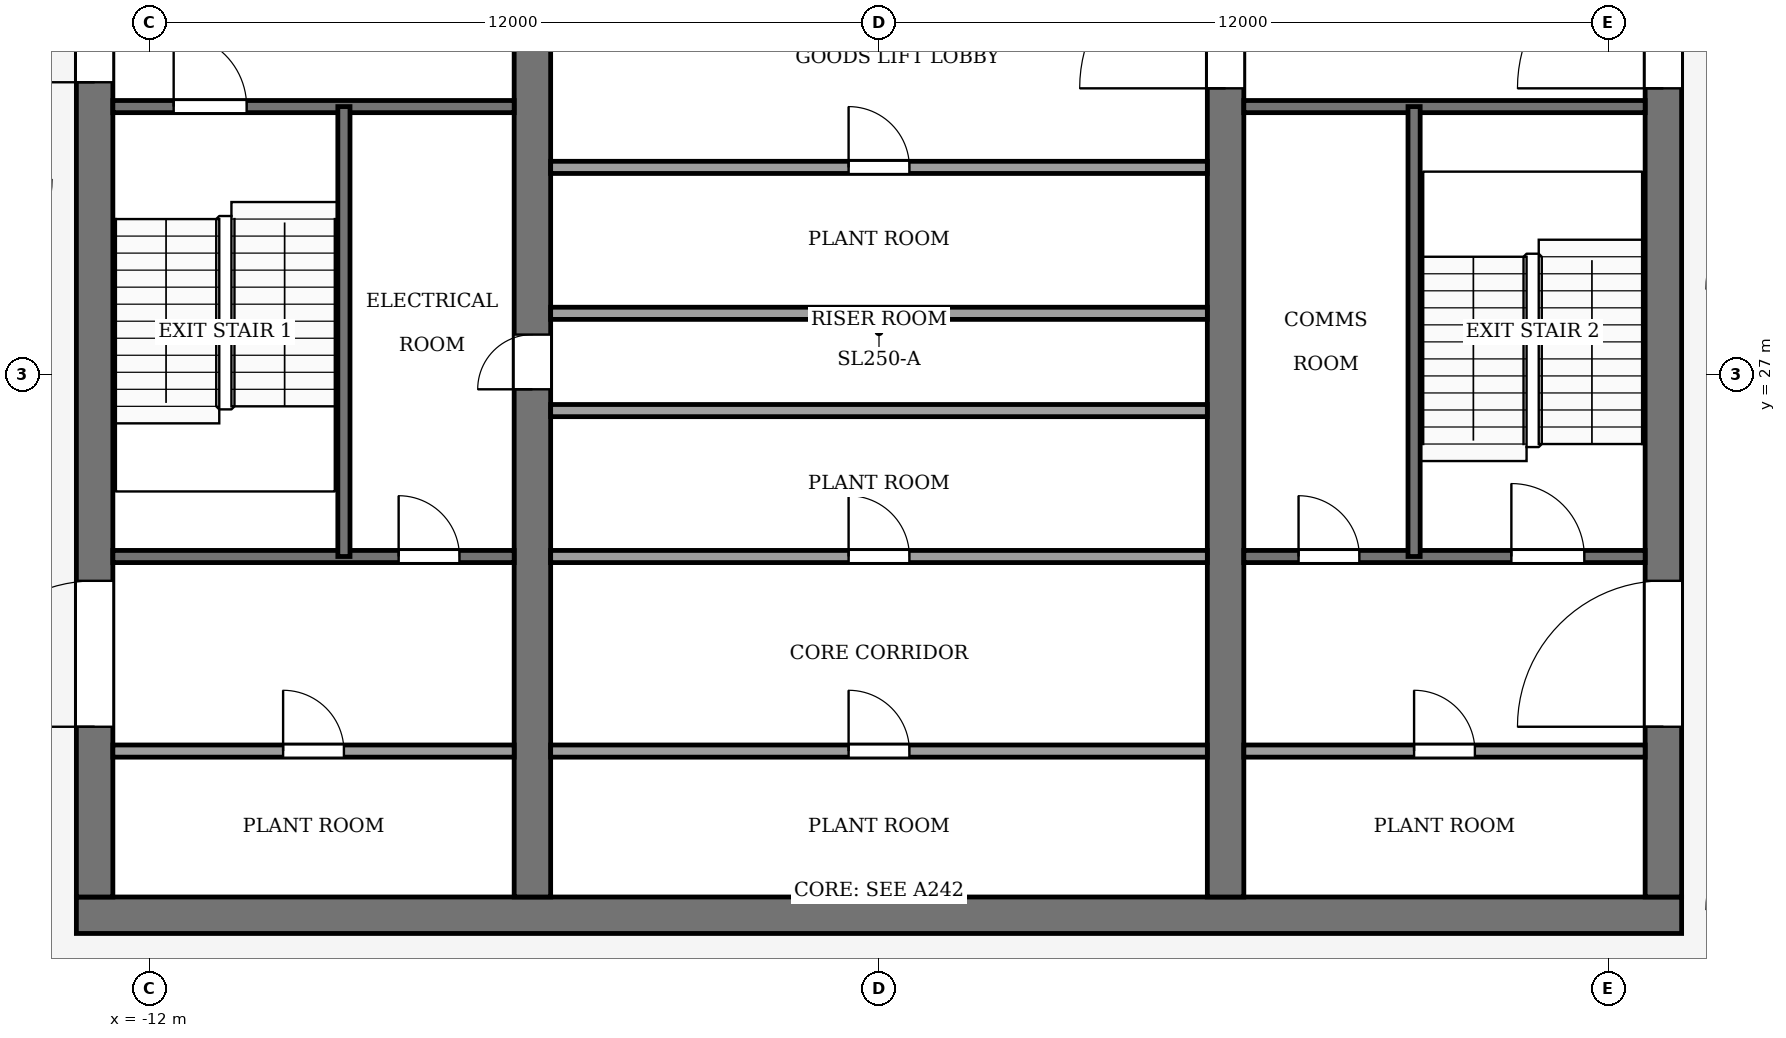
"""IFC4 building model, lengths in metres.
Left out: names, types, materials, properties, quantities, classifications, styles, units other than length and angle.
Written with IfcOpenShell. Run it as: python <this file> out.ifc"""

import sys

from ifc_helpers import new_model, si_unit, direction, frame, frame_2d, origin, place, context, subcontext, project, spatial, rectangle, extrude, element, fill, save


model = new_model("IFC4")
c1 = context("Model", 3, precision=1e-05, world=origin(), true_north=direction((0.0, 1.0)))
c2 = subcontext(c1, "Body", "Model", "MODEL_VIEW")
j1 = project(units=[si_unit("LENGTHUNIT", "METRE"), si_unit("PLANEANGLEUNIT", "RADIAN")], contexts=[c1])
p1 = place(None, origin())
s1 = spatial("IfcSite", under=j1, at=p1, CompositionType="ELEMENT")
p2 = place(p1, origin())
s2 = spatial("IfcBuilding", under=s1, at=p2, CompositionType="ELEMENT")
p3 = place(p2, frame((0.0, 0.0, 359.5)))
s3 = spatial("IfcBuildingStorey", under=s2, at=p3, CompositionType="ELEMENT", Elevation=359.5)
p4 = place(p3, frame((-13.2, 18.1, -0.15), z_axis=(0.0, 0.0, 1.0), x_axis=(1.0, 0.0, 0.0)))
e1 = element("IfcWall", 1, at=p4, inside=s3, PredefinedType="SHEAR", context=c2, shape_type="SweptSolid", body=[
    extrude(rectangle(XDim=26.4, YDim=0.6, at=frame_2d((13.2, 0.0))), origin(), (0.0, 0.0, 1.0), 4.5),
])
p5 = place(p3, frame((-12.9, 18.4, -0.15), z_axis=(0.0, 0.0, 1.0), x_axis=(0.0, 1.0, 0.0)))
e2 = element("IfcWall", 2, at=p5, inside=s3, PredefinedType="SHEAR", context=c2, shape_type="SweptSolid", body=[
    extrude(rectangle(XDim=19.2, YDim=0.6, at=frame_2d((9.6, 0.0))), origin(), (0.0, 0.0, 1.0), 4.5),
])
p6 = place(p5, frame((2.8, 0.0, 0.15)))
e3 = element("IfcOpeningElement", 3, at=p6, cuts=e2, PredefinedType="OPENING", context=c2, shape_type="SweptSolid", body=[
    extrude(rectangle(XDim=2.4, YDim=2.4, at=frame_2d((1.2, 1.2))), frame((0.0, 0.31, 0.0), z_axis=(0.0, -1.0, 0.0), x_axis=(1.0, 0.0, 0.0)), (0.0, 0.0, 1.0), 0.62),
])
p7 = place(p5, frame((13.4, 0.0, 0.15)))
e4 = element("IfcOpeningElement", 4, at=p7, cuts=e2, PredefinedType="OPENING", context=c2, shape_type="SweptSolid", body=[
    extrude(rectangle(XDim=1.4, YDim=2.2, at=frame_2d((0.7, 1.1))), frame((0.0, 0.31, 0.0), z_axis=(0.0, -1.0, 0.0), x_axis=(1.0, 0.0, 0.0)), (0.0, 0.0, 1.0), 0.62),
])
p8 = place(p3, frame((12.9, 18.4, -0.15), z_axis=(0.0, 0.0, 1.0), x_axis=(0.0, 1.0, 0.0)))
e5 = element("IfcWall", 5, at=p8, inside=s3, PredefinedType="SHEAR", context=c2, shape_type="SweptSolid", body=[
    extrude(rectangle(XDim=19.2, YDim=0.6, at=frame_2d((9.6, 0.0))), origin(), (0.0, 0.0, 1.0), 4.5),
])
p9 = place(p8, frame((2.8, 0.0, 0.15)))
e6 = element("IfcOpeningElement", 6, at=p9, cuts=e5, PredefinedType="OPENING", context=c2, shape_type="SweptSolid", body=[
    extrude(rectangle(XDim=2.4, YDim=2.4, at=frame_2d((1.2, 1.2))), frame((0.0, 0.31, 0.0), z_axis=(0.0, -1.0, 0.0), x_axis=(1.0, 0.0, 0.0)), (0.0, 0.0, 1.0), 0.62),
])
p10 = place(p8, frame((13.3, 0.0, 0.15)))
e7 = element("IfcOpeningElement", 7, at=p10, cuts=e5, PredefinedType="OPENING", context=c2, shape_type="SweptSolid", body=[
    extrude(rectangle(XDim=2.4, YDim=2.4, at=frame_2d((1.2, 1.2))), frame((0.0, 0.31, 0.0), z_axis=(0.0, -1.0, 0.0), x_axis=(1.0, 0.0, 0.0)), (0.0, 0.0, 1.0), 0.62),
])
p11 = place(p3, frame((-5.7, 18.4, -0.15), z_axis=(0.0, 0.0, 1.0), x_axis=(0.0, 1.0, 0.0)))
e8 = element("IfcWall", 8, at=p11, inside=s3, PredefinedType="SHEAR", context=c2, shape_type="SweptSolid", body=[
    extrude(rectangle(XDim=19.2, YDim=0.6, at=frame_2d((9.6, 0.0))), origin(), (0.0, 0.0, 1.0), 4.5),
])
p12 = place(p11, frame((8.35, 0.0, 0.15)))
e9 = element("IfcOpeningElement", 9, at=p12, cuts=e8, PredefinedType="OPENING", context=c2, shape_type="SweptSolid", body=[
    extrude(rectangle(XDim=0.9, YDim=2.1, at=frame_2d((0.45, 1.05))), frame((0.0, 0.31, 0.0), z_axis=(0.0, -1.0, 0.0), x_axis=(1.0, 0.0, 0.0)), (0.0, 0.0, 1.0), 0.62),
])
p13 = place(p3, frame((5.7, 18.4, -0.15), z_axis=(0.0, 0.0, 1.0), x_axis=(0.0, 1.0, 0.0)))
e10 = element("IfcWall", 10, at=p13, inside=s3, PredefinedType="SHEAR", context=c2, shape_type="SweptSolid", body=[
    extrude(rectangle(XDim=19.2, YDim=0.6, at=frame_2d((9.6, 0.0))), origin(), (0.0, 0.0, 1.0), 4.5),
])
p14 = place(p13, frame((13.3, 0.0, 0.15)))
e11 = element("IfcOpeningElement", 11, at=p14, cuts=e10, PredefinedType="OPENING", context=c2, shape_type="SweptSolid", body=[
    extrude(rectangle(XDim=2.4, YDim=2.4, at=frame_2d((1.2, 1.2))), frame((0.0, 0.31, 0.0), z_axis=(0.0, -1.0, 0.0), x_axis=(1.0, 0.0, 0.0)), (0.0, 0.0, 1.0), 0.62),
])
p15 = place(p3, frame((-12.6, 20.8, 0.0), z_axis=(0.0, 0.0, 1.0), x_axis=(1.0, 0.0, 0.0)))
e12 = element("IfcWall", 12, at=p15, inside=s3, PredefinedType="PARTITIONING", context=c2, shape_type="SweptSolid", body=[
    extrude(rectangle(XDim=6.6, YDim=0.2, at=frame_2d((3.3, 0.0))), origin(), (0.0, 0.0, 1.0), 4.35),
])
p16 = place(p15, frame((2.8, 0.0, 0.0)))
e13 = element("IfcOpeningElement", 13, at=p16, cuts=e12, PredefinedType="OPENING", context=c2, shape_type="SweptSolid", body=[
    extrude(rectangle(XDim=1.0, YDim=2.1, at=frame_2d((0.5, 1.05))), frame((0.0, 0.11, 0.0), z_axis=(0.0, -1.0, 0.0), x_axis=(1.0, 0.0, 0.0)), (0.0, 0.0, 1.0), 0.22),
])
p17 = place(p3, frame((-5.4, 20.8, 0.0), z_axis=(0.0, 0.0, 1.0), x_axis=(1.0, 0.0, 0.0)))
e14 = element("IfcWall", 14, at=p17, inside=s3, PredefinedType="PARTITIONING", context=c2, shape_type="SweptSolid", body=[
    extrude(rectangle(XDim=10.8, YDim=0.2, at=frame_2d((5.4, 0.0))), origin(), (0.0, 0.0, 1.0), 4.35),
])
p18 = place(p17, frame((4.9, 0.0, 0.0)))
e15 = element("IfcOpeningElement", 15, at=p18, cuts=e14, PredefinedType="OPENING", context=c2, shape_type="SweptSolid", body=[
    extrude(rectangle(XDim=1.0, YDim=2.1, at=frame_2d((0.5, 1.05))), frame((0.0, 0.11, 0.0), z_axis=(0.0, -1.0, 0.0), x_axis=(1.0, 0.0, 0.0)), (0.0, 0.0, 1.0), 0.22),
])
p19 = place(p3, frame((6.0, 20.8, 0.0), z_axis=(0.0, 0.0, 1.0), x_axis=(1.0, 0.0, 0.0)))
e16 = element("IfcWall", 16, at=p19, inside=s3, PredefinedType="PARTITIONING", context=c2, shape_type="SweptSolid", body=[
    extrude(rectangle(XDim=6.6, YDim=0.2, at=frame_2d((3.3, 0.0))), origin(), (0.0, 0.0, 1.0), 4.35),
])
p20 = place(p19, frame((2.8, 0.0, 0.0)))
e17 = element("IfcOpeningElement", 17, at=p20, cuts=e16, PredefinedType="OPENING", context=c2, shape_type="SweptSolid", body=[
    extrude(rectangle(XDim=1.0, YDim=2.1, at=frame_2d((0.5, 1.05))), frame((0.0, 0.11, 0.0), z_axis=(0.0, -1.0, 0.0), x_axis=(1.0, 0.0, 0.0)), (0.0, 0.0, 1.0), 0.22),
])
p21 = place(p3, frame((-12.6, 24.0, 0.0), z_axis=(0.0, 0.0, 1.0), x_axis=(1.0, 0.0, 0.0)))
e18 = element("IfcWall", 18, at=p21, inside=s3, PredefinedType="PARTITIONING", context=c2, shape_type="SweptSolid", body=[
    extrude(rectangle(XDim=6.6, YDim=0.2, at=frame_2d((3.3, 0.0))), origin(), (0.0, 0.0, 1.0), 4.35),
])
p22 = place(p21, frame((4.7, 0.0, 0.0)))
e19 = element("IfcOpeningElement", 19, at=p22, cuts=e18, PredefinedType="OPENING", context=c2, shape_type="SweptSolid", body=[
    extrude(rectangle(XDim=1.0, YDim=2.1, at=frame_2d((0.5, 1.05))), frame((0.0, 0.11, 0.0), z_axis=(0.0, -1.0, 0.0), x_axis=(1.0, 0.0, 0.0)), (0.0, 0.0, 1.0), 0.22),
])
p23 = place(p3, frame((-5.4, 24.0, 0.0), z_axis=(0.0, 0.0, 1.0), x_axis=(1.0, 0.0, 0.0)))
e20 = element("IfcWall", 20, at=p23, inside=s3, PredefinedType="PARTITIONING", context=c2, shape_type="SweptSolid", body=[
    extrude(rectangle(XDim=10.8, YDim=0.2, at=frame_2d((5.4, 0.0))), origin(), (0.0, 0.0, 1.0), 4.35),
])
p24 = place(p23, frame((4.9, 0.0, 0.0)))
e21 = element("IfcOpeningElement", 21, at=p24, cuts=e20, PredefinedType="OPENING", context=c2, shape_type="SweptSolid", body=[
    extrude(rectangle(XDim=1.0, YDim=2.1, at=frame_2d((0.5, 1.05))), frame((0.0, 0.11, 0.0), z_axis=(0.0, -1.0, 0.0), x_axis=(1.0, 0.0, 0.0)), (0.0, 0.0, 1.0), 0.22),
])
p25 = place(p3, frame((6.0, 24.0, 0.0), z_axis=(0.0, 0.0, 1.0), x_axis=(1.0, 0.0, 0.0)))
e22 = element("IfcWall", 22, at=p25, inside=s3, PredefinedType="PARTITIONING", context=c2, shape_type="SweptSolid", body=[
    extrude(rectangle(XDim=6.6, YDim=0.2, at=frame_2d((3.3, 0.0))), origin(), (0.0, 0.0, 1.0), 4.35),
])
p26 = place(p25, frame((0.9, 0.0, 0.0)))
e23 = element("IfcOpeningElement", 23, at=p26, cuts=e22, PredefinedType="OPENING", context=c2, shape_type="SweptSolid", body=[
    extrude(rectangle(XDim=1.0, YDim=2.1, at=frame_2d((0.5, 1.05))), frame((0.0, 0.11, 0.0), z_axis=(0.0, -1.0, 0.0), x_axis=(1.0, 0.0, 0.0)), (0.0, 0.0, 1.0), 0.22),
])
p27 = place(p25, frame((4.4, 0.0, 0.0)))
e24 = element("IfcOpeningElement", 24, at=p27, cuts=e22, PredefinedType="OPENING", context=c2, shape_type="SweptSolid", body=[
    extrude(rectangle(XDim=1.2, YDim=2.2, at=frame_2d((0.6, 1.1))), frame((0.0, 0.11, 0.0), z_axis=(0.0, -1.0, 0.0), x_axis=(1.0, 0.0, 0.0)), (0.0, 0.0, 1.0), 0.22),
])
for number, where, z_axis, x_axis in (
    (25, (-5.4, 26.4, 0.0), (0.0, 0.0, 1.0), (1.0, 0.0, 0.0)),
    (26, (-5.4, 28.0, 0.0), (0.0, 0.0, 1.0), (1.0, 0.0, 0.0)),
):
    element("IfcWall", number, at=place(p3, frame(where, z_axis=z_axis, x_axis=x_axis)), inside=s3, PredefinedType="PARTITIONING", context=c2, shape_type="SweptSolid", body=[
        extrude(rectangle(XDim=10.8, YDim=0.2, at=frame_2d((5.4, 0.0))), origin(), (0.0, 0.0, 1.0), 4.35),
    ])
p28 = place(p3, frame((-5.4, 30.4, 0.0), z_axis=(0.0, 0.0, 1.0), x_axis=(1.0, 0.0, 0.0)))
e27 = element("IfcWall", 27, at=p28, inside=s3, PredefinedType="PARTITIONING", context=c2, shape_type="SweptSolid", body=[
    extrude(rectangle(XDim=10.8, YDim=0.2, at=frame_2d((5.4, 0.0))), origin(), (0.0, 0.0, 1.0), 4.35),
])
p29 = place(p28, frame((4.9, 0.0, 0.0)))
e28 = element("IfcOpeningElement", 28, at=p29, cuts=e27, PredefinedType="OPENING", context=c2, shape_type="SweptSolid", body=[
    extrude(rectangle(XDim=1.0, YDim=2.1, at=frame_2d((0.5, 1.05))), frame((0.0, 0.11, 0.0), z_axis=(0.0, -1.0, 0.0), x_axis=(1.0, 0.0, 0.0)), (0.0, 0.0, 1.0), 0.22),
])
p30 = place(p3, frame((-12.6, 31.4, 0.0), z_axis=(0.0, 0.0, 1.0), x_axis=(1.0, 0.0, 0.0)))
e29 = element("IfcWall", 29, at=p30, inside=s3, PredefinedType="PARTITIONING", context=c2, shape_type="SweptSolid", body=[
    extrude(rectangle(XDim=6.6, YDim=0.2, at=frame_2d((3.3, 0.0))), origin(), (0.0, 0.0, 1.0), 4.35),
])
p31 = place(p30, frame((1.0, 0.0, 0.0)))
e30 = element("IfcOpeningElement", 30, at=p31, cuts=e29, PredefinedType="OPENING", context=c2, shape_type="SweptSolid", body=[
    extrude(rectangle(XDim=1.2, YDim=2.2, at=frame_2d((0.6, 1.1))), frame((0.0, 0.11, 0.0), z_axis=(0.0, -1.0, 0.0), x_axis=(1.0, 0.0, 0.0)), (0.0, 0.0, 1.0), 0.22),
])
p32 = place(p3, frame((6.0, 31.4, 0.0), z_axis=(0.0, 0.0, 1.0), x_axis=(1.0, 0.0, 0.0)))
e31 = element("IfcWall", 31, at=p32, inside=s3, PredefinedType="PARTITIONING", context=c2, shape_type="SweptSolid", body=[
    extrude(rectangle(XDim=6.6, YDim=0.2, at=frame_2d((3.3, 0.0))), origin(), (0.0, 0.0, 1.0), 4.35),
])
for number, where, z_axis, x_axis in (
    (32, (-8.8, 24.0, 0.0), (0.0, 0.0, 1.0), (0.0, 1.0, 0.0)),
    (33, (8.8, 24.0, 0.0), (0.0, 0.0, 1.0), (0.0, 1.0, 0.0)),
):
    element("IfcWall", number, at=place(p3, frame(where, z_axis=z_axis, x_axis=x_axis)), inside=s3, PredefinedType="PARTITIONING", context=c2, shape_type="SweptSolid", body=[
        extrude(rectangle(XDim=7.4, YDim=0.2, at=frame_2d((3.7, 0.0))), origin(), (0.0, 0.0, 1.0), 4.35),
    ])
p33 = place(p18, origin())
e34 = element("IfcDoor", 34, at=p33, inside=s3, OperationType="SINGLE_SWING_LEFT", PredefinedType="DOOR", context=c2, shape_type="SweptSolid", body=[
    extrude(rectangle(XDim=1.0, YDim=2.1, at=frame_2d((0.5, 1.05))), frame((0.0, 0.025, 0.0), z_axis=(0.0, -1.0, 0.0), x_axis=(1.0, 0.0, 0.0)), (0.0, 0.0, 1.0), 0.05),
])
fill(e15, e34)
p34 = place(p24, origin())
e35 = element("IfcDoor", 35, at=p34, inside=s3, OperationType="SINGLE_SWING_RIGHT", PredefinedType="DOOR", context=c2, shape_type="SweptSolid", body=[
    extrude(rectangle(XDim=1.0, YDim=2.1, at=frame_2d((0.5, 1.05))), frame((0.0, 0.025, 0.0), z_axis=(0.0, -1.0, 0.0), x_axis=(1.0, 0.0, 0.0)), (0.0, 0.0, 1.0), 0.05),
])
fill(e21, e35)
p35 = place(p29, origin())
e36 = element("IfcDoor", 36, at=p35, inside=s3, OperationType="SINGLE_SWING_LEFT", PredefinedType="DOOR", context=c2, shape_type="SweptSolid", body=[
    extrude(rectangle(XDim=1.0, YDim=2.1, at=frame_2d((0.5, 1.05))), frame((0.0, 0.025, 0.0), z_axis=(0.0, -1.0, 0.0), x_axis=(1.0, 0.0, 0.0)), (0.0, 0.0, 1.0), 0.05),
])
fill(e28, e36)
p36 = place(p16, origin())
e37 = element("IfcDoor", 37, at=p36, inside=s3, OperationType="SINGLE_SWING_RIGHT", PredefinedType="DOOR", context=c2, shape_type="SweptSolid", body=[
    extrude(rectangle(XDim=1.0, YDim=2.1, at=frame_2d((0.5, 1.05))), frame((0.0, 0.025, 0.0), z_axis=(0.0, -1.0, 0.0), x_axis=(1.0, 0.0, 0.0)), (0.0, 0.0, 1.0), 0.05),
])
fill(e13, e37)
p37 = place(p20, origin())
e38 = element("IfcDoor", 38, at=p37, inside=s3, OperationType="SINGLE_SWING_LEFT", PredefinedType="DOOR", context=c2, shape_type="SweptSolid", body=[
    extrude(rectangle(XDim=1.0, YDim=2.1, at=frame_2d((0.5, 1.05))), frame((0.0, 0.025, 0.0), z_axis=(0.0, -1.0, 0.0), x_axis=(1.0, 0.0, 0.0)), (0.0, 0.0, 1.0), 0.05),
])
fill(e17, e38)
p38 = place(p22, origin())
e39 = element("IfcDoor", 39, at=p38, inside=s3, OperationType="SINGLE_SWING_LEFT", PredefinedType="DOOR", context=c2, shape_type="SweptSolid", body=[
    extrude(rectangle(XDim=1.0, YDim=2.1, at=frame_2d((0.5, 1.05))), frame((0.0, 0.025, 0.0), z_axis=(0.0, -1.0, 0.0), x_axis=(1.0, 0.0, 0.0)), (0.0, 0.0, 1.0), 0.05),
])
fill(e19, e39)
p39 = place(p26, origin())
e40 = element("IfcDoor", 40, at=p39, inside=s3, OperationType="SINGLE_SWING_RIGHT", PredefinedType="DOOR", context=c2, shape_type="SweptSolid", body=[
    extrude(rectangle(XDim=1.0, YDim=2.1, at=frame_2d((0.5, 1.05))), frame((0.0, 0.025, 0.0), z_axis=(0.0, -1.0, 0.0), x_axis=(1.0, 0.0, 0.0)), (0.0, 0.0, 1.0), 0.05),
])
fill(e23, e40)
p40 = place(p12, origin())
e41 = element("IfcDoor", 41, at=p40, inside=s3, OperationType="SINGLE_SWING_LEFT", PredefinedType="DOOR", context=c2, shape_type="SweptSolid", body=[
    extrude(rectangle(XDim=0.9, YDim=2.1, at=frame_2d((0.45, 1.05))), frame((0.0, 0.025, 0.0), z_axis=(0.0, -1.0, 0.0), x_axis=(1.0, 0.0, 0.0)), (0.0, 0.0, 1.0), 0.05),
])
fill(e9, e41)
p41 = place(p31, origin())
e42 = element("IfcDoor", 42, at=p41, inside=s3, OperationType="SINGLE_SWING_LEFT", PredefinedType="DOOR", context=c2, shape_type="SweptSolid", body=[
    extrude(rectangle(XDim=1.2, YDim=2.2, at=frame_2d((0.6, 1.1))), frame((0.0, 0.025, 0.0), z_axis=(0.0, -1.0, 0.0), x_axis=(1.0, 0.0, 0.0)), (0.0, 0.0, 1.0), 0.05),
])
fill(e30, e42)
p42 = place(p27, origin())
e43 = element("IfcDoor", 43, at=p42, inside=s3, OperationType="SINGLE_SWING_RIGHT", PredefinedType="DOOR", context=c2, shape_type="SweptSolid", body=[
    extrude(rectangle(XDim=1.2, YDim=2.2, at=frame_2d((0.6, 1.1))), frame((0.0, 0.025, 0.0), z_axis=(0.0, -1.0, 0.0), x_axis=(1.0, 0.0, 0.0)), (0.0, 0.0, 1.0), 0.05),
])
fill(e24, e43)
p43 = place(p14, origin())
e44 = element("IfcDoor", 44, at=p43, inside=s3, OperationType="DOUBLE_DOOR_SINGLE_SWING", PredefinedType="DOOR", context=c2, shape_type="SweptSolid", body=[
    extrude(rectangle(XDim=2.4, YDim=2.4, at=frame_2d((1.2, 1.2))), frame((0.0, 0.025, 0.0), z_axis=(0.0, -1.0, 0.0), x_axis=(1.0, 0.0, 0.0)), (0.0, 0.0, 1.0), 0.05),
])
fill(e11, e44)
p44 = place(p6, origin())
e45 = element("IfcDoor", 45, at=p44, inside=s3, OperationType="DOUBLE_DOOR_SINGLE_SWING", PredefinedType="DOOR", context=c2, shape_type="SweptSolid", body=[
    extrude(rectangle(XDim=2.4, YDim=2.4, at=frame_2d((1.2, 1.2))), frame((0.0, 0.025, 0.0), z_axis=(0.0, -1.0, 0.0), x_axis=(1.0, 0.0, 0.0)), (0.0, 0.0, 1.0), 0.05),
])
fill(e3, e45)
p45 = place(p9, origin())
e46 = element("IfcDoor", 46, at=p45, inside=s3, OperationType="DOUBLE_DOOR_SINGLE_SWING", PredefinedType="DOOR", context=c2, shape_type="SweptSolid", body=[
    extrude(rectangle(XDim=2.4, YDim=2.4, at=frame_2d((1.2, 1.2))), frame((0.0, 0.025, 0.0), z_axis=(0.0, -1.0, 0.0), x_axis=(1.0, 0.0, 0.0)), (0.0, 0.0, 1.0), 0.05),
])
fill(e6, e46)
p46 = place(p10, origin())
e47 = element("IfcDoor", 47, at=p46, inside=s3, OperationType="DOUBLE_DOOR_SINGLE_SWING", PredefinedType="DOOR", context=c2, shape_type="SweptSolid", body=[
    extrude(rectangle(XDim=2.4, YDim=2.4, at=frame_2d((1.2, 1.2))), frame((0.0, 0.025, 0.0), z_axis=(0.0, -1.0, 0.0), x_axis=(1.0, 0.0, 0.0)), (0.0, 0.0, 1.0), 0.05),
])
fill(e7, e47)
p47 = place(p7, origin())
e48 = element("IfcDoor", 48, at=p47, inside=s3, OperationType="SINGLE_SWING_LEFT", PredefinedType="DOOR", context=c2, shape_type="SweptSolid", body=[
    extrude(rectangle(XDim=1.4, YDim=2.2, at=frame_2d((0.7, 1.1))), frame((0.0, 0.025, 0.0), z_axis=(0.0, -1.0, 0.0), x_axis=(1.0, 0.0, 0.0)), (0.0, 0.0, 1.0), 0.05),
])
fill(e4, e48)
save(model, sys.argv[1])
